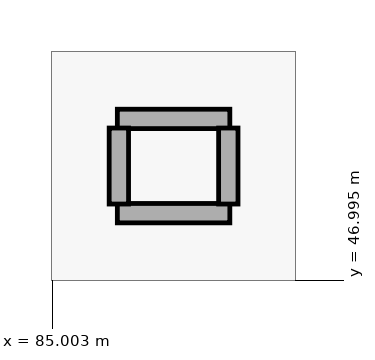
"""IFC4 building model, lengths in metres.
Left out: names, types, materials, properties, quantities, classifications, styles, units other than length and angle.
Written with IfcOpenShell. Run it as: python <this file> out.ifc"""

import sys

from ifc_helpers import new_model, si_unit, direction, frame, frame_2d, origin, place, context, subcontext, project, spatial, rectangle, extrude, element, save


model = new_model("IFC4")
c1 = context("Model", 3, precision=1e-05, world=origin(), true_north=direction((0.0, 1.0)))
c2 = subcontext(c1, "Body", "Model", "MODEL_VIEW")
j1 = project(units=[si_unit("LENGTHUNIT", "METRE"), si_unit("PLANEANGLEUNIT", "RADIAN")], contexts=[c1])
p1 = place(None, origin())
s1 = spatial("IfcSite", under=j1, at=p1, CompositionType="ELEMENT")
p2 = place(p1, origin())
s2 = spatial("IfcBuilding", under=s1, at=p2, CompositionType="ELEMENT")
p3 = place(p2, origin())
s3 = spatial("IfcBuildingStorey", under=s2, at=p3, CompositionType="ELEMENT", Elevation=0.0)
for number, where, z_axis, x_axis in (
    (1, (85.86, 49.12, 0.0), (0.0, 0.0, 1.0), (1.0, 0.0, 0.0)),
    (2, (85.86, 47.88, 0.0), (0.0, 0.0, 1.0), (1.0, 0.0, 0.0)),
):
    element("IfcWall", number, at=place(p3, frame(where, z_axis=z_axis, x_axis=x_axis)), inside=s3, PredefinedType="PARTITIONING", context=c2, shape_type="SweptSolid", body=[
        extrude(rectangle(XDim=1.48, YDim=0.255, at=frame_2d((0.74, 0.0))), origin(), (0.0, 0.0, 1.0), 4.77),
    ])
p4 = place(p3, frame((85.88, 48.0, 0.0), z_axis=(0.0, 0.0, 1.0), x_axis=(0.0, 1.0, 0.0)))
e3 = element("IfcWall", 3, at=p4, inside=s3, PredefinedType="PARTITIONING", context=c2, shape_type="SweptSolid", body=[
    extrude(rectangle(XDim=1.0, YDim=0.255, at=frame_2d((0.5, 0.0))), origin(), (0.0, 0.0, 1.0), 4.77),
])
p5 = place(p3, frame((87.32, 48.0, 0.0), z_axis=(0.0, 0.0, 1.0), x_axis=(0.0, 1.0, 0.0)))
e4 = element("IfcWall", 4, at=p5, inside=s3, PredefinedType="PARTITIONING", context=c2, shape_type="SweptSolid", body=[
    extrude(rectangle(XDim=1.0, YDim=0.255, at=frame_2d((0.5, 0.0))), origin(), (0.0, 0.0, 1.0), 5.04),
])
save(model, sys.argv[1])
